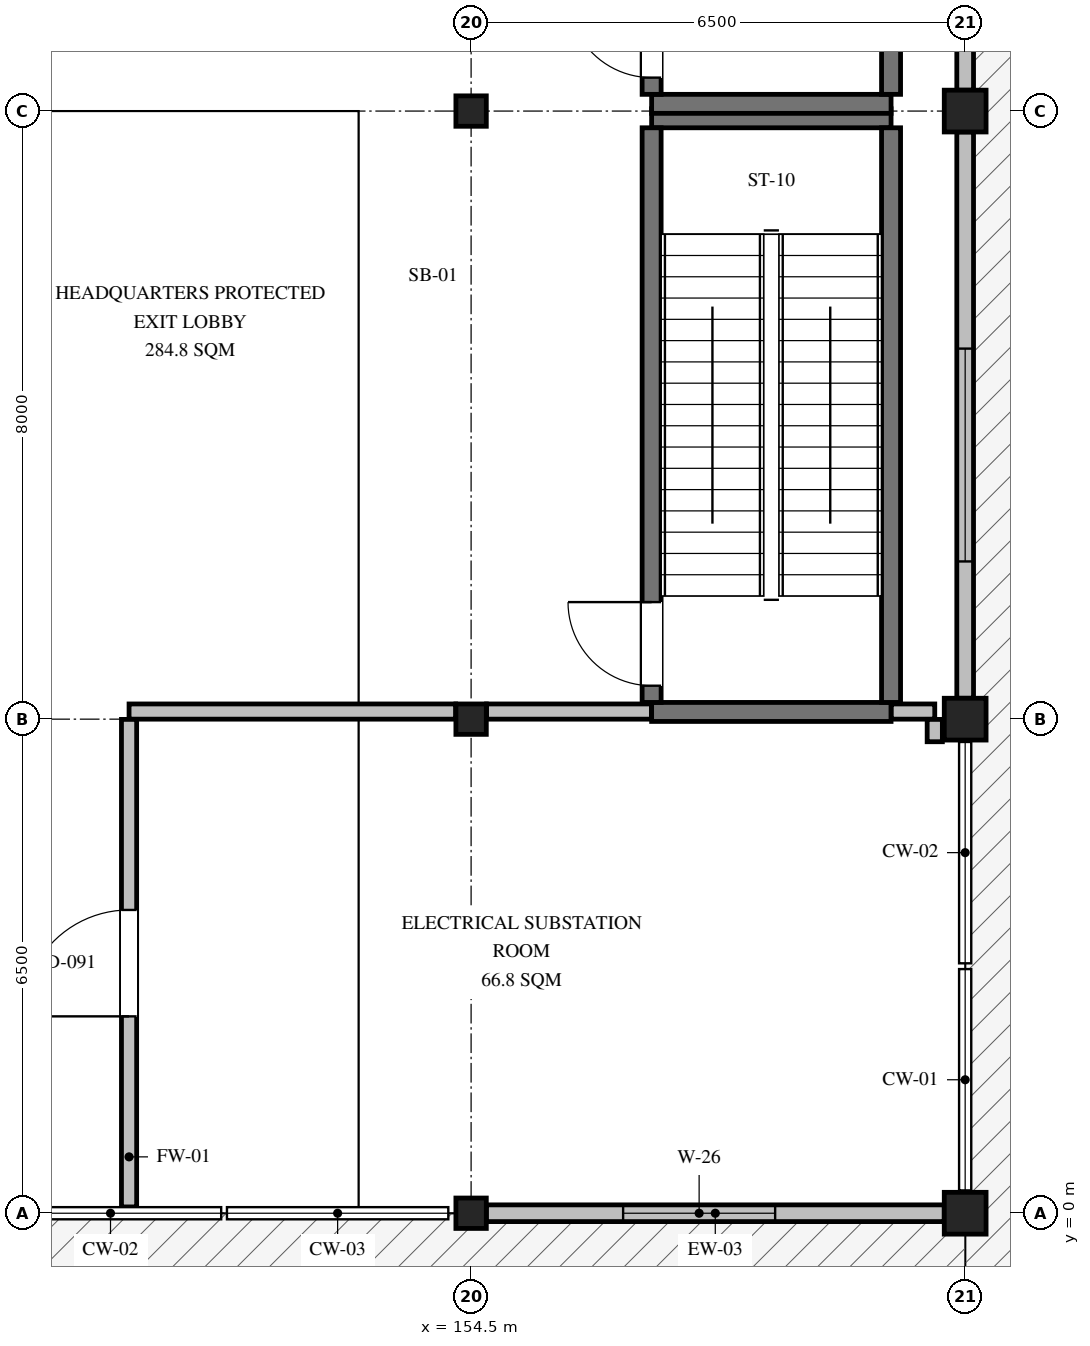
"""IFC4 building model, lengths in metres.
Left out: names, types, materials, properties, quantities, classifications, styles, units other than length and angle.
Written with IfcOpenShell. Run it as: python <this file> out.ifc"""

import sys

from ifc_helpers import new_model, si_unit, direction, frame, frame_2d, origin, origin_2d, place, context, subcontext, project, spatial, rectangle, hollow_rectangle, i_section, extrude, element, fill, save


model = new_model("IFC4")
c1 = context("Model", 3, precision=1e-05, world=origin(), true_north=direction((0.0, 1.0)))
c2 = subcontext(c1, "Body", "Model", "MODEL_VIEW")
j1 = project(units=[si_unit("LENGTHUNIT", "METRE"), si_unit("PLANEANGLEUNIT", "RADIAN")], contexts=[c1])
p1 = place(None, origin())
s1 = spatial("IfcSite", under=j1, at=p1, CompositionType="ELEMENT")
p2 = place(p1, origin())
s2 = spatial("IfcBuilding", under=s1, at=p2, CompositionType="ELEMENT")
p3 = place(p2, frame((0.0, 0.0, 0.45)))
s3 = spatial("IfcBuildingStorey", under=s2, at=p3, CompositionType="ELEMENT", Elevation=0.45)
for number, where, z_axis, x_axis in (
    (1, (154.5, 0.0, -0.45), (0.0, 0.0, 1.0), (1.0, 0.0, 0.0)),
    (2, (154.5, 6.5, -0.45), (0.0, 0.0, 1.0), (1.0, 0.0, 0.0)),
    (3, (154.5, 14.5, -0.45), (0.0, 0.0, 1.0), (1.0, 0.0, 0.0)),
):
    element("IfcColumn", number, at=place(p3, frame(where, z_axis=z_axis, x_axis=x_axis)), inside=s3, PredefinedType="COLUMN", context=c2, shape_type="SweptSolid", body=[
        extrude(i_section(OverallWidth=0.4, OverallDepth=0.4, WebThickness=0.013, FlangeThickness=0.021, FilletRadius=0.022, at=origin_2d()), origin(), (0.0, 0.0, 1.0), 5.85),
    ])
for number, where, z_axis, x_axis in (
    (4, (161.0, 0.0, -0.45), (0.0, 0.0, 1.0), (1.0, 0.0, 0.0)),
    (5, (161.0, 6.5, -0.45), (0.0, 0.0, 1.0), (1.0, 0.0, 0.0)),
    (6, (161.0, 14.5, -0.45), (0.0, 0.0, 1.0), (1.0, 0.0, 0.0)),
):
    element("IfcColumn", number, at=place(p3, frame(where, z_axis=z_axis, x_axis=x_axis)), inside=s3, PredefinedType="COLUMN", context=c2, shape_type="SweptSolid", body=[
        extrude(hollow_rectangle(XDim=0.55, YDim=0.55, WallThickness=0.026, at=origin_2d()), origin(), (0.0, 0.0, 1.0), 5.85),
    ])
p4 = place(p3, frame((154.7, 0.0, 0.0), z_axis=(0.0, 0.0, 1.0), x_axis=(1.0, 0.0, 0.0)))
e7 = element("IfcWall", 7, at=p4, inside=s3, PredefinedType="SOLIDWALL", context=c2, shape_type="SweptSolid", body=[
    extrude(rectangle(XDim=6.025, YDim=0.22, at=frame_2d((3.013, 0.0))), origin(), (0.0, 0.0, 1.0), 4.694),
])
p5 = place(p4, frame((1.8, 0.0, 1.0)))
e8 = element("IfcOpeningElement", 8, at=p5, cuts=e7, PredefinedType="OPENING", context=c2, shape_type="SweptSolid", body=[
    extrude(rectangle(XDim=2.0, YDim=1.8, at=frame_2d((1.0, 0.9))), frame((0.0, 0.12, 0.0), z_axis=(0.0, -1.0, 0.0), x_axis=(1.0, 0.0, 0.0)), (0.0, 0.0, 1.0), 0.24),
])
p6 = place(p3, frame((161.0, 6.775, 0.0), z_axis=(0.0, 0.0, 1.0), x_axis=(0.0, 1.0, 0.0)))
e9 = element("IfcWall", 9, at=p6, inside=s3, PredefinedType="SOLIDWALL", context=c2, shape_type="SweptSolid", body=[
    extrude(rectangle(XDim=7.45, YDim=0.22, at=frame_2d((3.725, 0.0))), origin(), (0.0, 0.0, 1.0), 4.606),
])
p7 = place(p6, frame((1.8, 0.0, 1.05)))
e10 = element("IfcOpeningElement", 10, at=p7, cuts=e9, PredefinedType="OPENING", context=c2, shape_type="SweptSolid", body=[
    extrude(rectangle(XDim=2.8, YDim=1.8, at=frame_2d((1.4, 0.9))), frame((0.0, 0.12, 0.0), z_axis=(0.0, -1.0, 0.0), x_axis=(1.0, 0.0, 0.0)), (0.0, 0.0, 1.0), 0.24),
])
p8 = place(p3, frame((161.0, 14.775, 0.0), z_axis=(0.0, 0.0, 1.0), x_axis=(0.0, 1.0, 0.0)))
e11 = element("IfcWall", 11, at=p8, inside=s3, PredefinedType="SOLIDWALL", context=c2, shape_type="SweptSolid", body=[
    extrude(rectangle(XDim=7.45, YDim=0.22, at=frame_2d((3.725, 0.0))), origin(), (0.0, 0.0, 1.0), 4.544),
])
p9 = place(p8, frame((1.8, 0.0, 1.05)))
e12 = element("IfcOpeningElement", 12, at=p9, cuts=e11, PredefinedType="OPENING", context=c2, shape_type="SweptSolid", body=[
    extrude(rectangle(XDim=1.0, YDim=2.0, at=frame_2d((0.5, 1.0))), frame((0.0, 0.12, 0.0), z_axis=(0.0, -1.0, 0.0), x_axis=(1.0, 0.0, 0.0)), (0.0, 0.0, 1.0), 0.24),
])
for number, where, z_axis, x_axis in (
    (13, (156.875, 6.595, 0.0), (0.0, 0.0, 1.0), (1.0, 0.0, 0.0)),
    (14, (156.875, 14.405, 0.0), (0.0, 0.0, 1.0), (1.0, 0.0, 0.0)),
):
    element("IfcWall", number, at=place(p3, frame(where, z_axis=z_axis, x_axis=x_axis)), inside=s3, PredefinedType="SHEAR", context=c2, shape_type="SweptSolid", body=[
        extrude(rectangle(XDim=3.15, YDim=0.25, at=frame_2d((1.575, 0.0))), origin(), (0.0, 0.0, 1.0), 5.2),
    ])
p10 = place(p3, frame((156.875, 6.72, 0.0), z_axis=(0.0, 0.0, 1.0), x_axis=(0.0, 1.0, 0.0)))
e15 = element("IfcWall", 15, at=p10, inside=s3, PredefinedType="SHEAR", context=c2, shape_type="SweptSolid", body=[
    extrude(rectangle(XDim=7.56, YDim=0.25, at=frame_2d((3.78, 0.0))), origin(), (0.0, 0.0, 1.0), 5.2),
])
p11 = place(p10, frame((0.22, 0.0, 0.0)))
e16 = element("IfcOpeningElement", 16, at=p11, cuts=e15, PredefinedType="OPENING", context=c2, shape_type="SweptSolid", body=[
    extrude(rectangle(XDim=1.1, YDim=2.15, at=frame_2d((0.55, 1.075))), frame((0.0, 0.135, 0.0), z_axis=(0.0, -1.0, 0.0), x_axis=(1.0, 0.0, 0.0)), (0.0, 0.0, 1.0), 0.27),
])
p12 = place(p3, frame((160.025, 6.72, 0.0), z_axis=(0.0, 0.0, 1.0), x_axis=(0.0, 1.0, 0.0)))
e17 = element("IfcWall", 17, at=p12, inside=s3, PredefinedType="SHEAR", context=c2, shape_type="SweptSolid", body=[
    extrude(rectangle(XDim=7.56, YDim=0.25, at=frame_2d((3.78, 0.0))), origin(), (0.0, 0.0, 1.0), 5.2),
])
p13 = place(p3, frame((156.875, 14.595, 0.0), z_axis=(0.0, 0.0, 1.0), x_axis=(1.0, 0.0, 0.0)))
e18 = element("IfcWall", 18, at=p13, inside=s3, PredefinedType="SHEAR", context=c2, shape_type="SweptSolid", body=[
    extrude(rectangle(XDim=3.15, YDim=0.25, at=frame_2d((1.575, 0.0))), origin(), (0.0, 0.0, 1.0), 5.2),
])
p14 = place(p3, frame((156.875, 14.72, 0.0), z_axis=(0.0, 0.0, 1.0), x_axis=(0.0, 1.0, 0.0)))
e19 = element("IfcWall", 19, at=p14, inside=s3, PredefinedType="SHEAR", context=c2, shape_type="SweptSolid", body=[
    extrude(rectangle(XDim=7.56, YDim=0.25, at=frame_2d((3.78, 0.0))), origin(), (0.0, 0.0, 1.0), 5.2),
])
p15 = place(p14, frame((0.22, 0.0, 0.0)))
e20 = element("IfcOpeningElement", 20, at=p15, cuts=e19, PredefinedType="OPENING", context=c2, shape_type="SweptSolid", body=[
    extrude(rectangle(XDim=1.1, YDim=2.15, at=frame_2d((0.55, 1.075))), frame((0.0, 0.135, 0.0), z_axis=(0.0, -1.0, 0.0), x_axis=(1.0, 0.0, 0.0)), (0.0, 0.0, 1.0), 0.27),
])
p16 = place(p3, frame((160.025, 14.72, 0.0), z_axis=(0.0, 0.0, 1.0), x_axis=(0.0, 1.0, 0.0)))
e21 = element("IfcWall", 21, at=p16, inside=s3, PredefinedType="SHEAR", context=c2, shape_type="SweptSolid", body=[
    extrude(rectangle(XDim=7.56, YDim=0.25, at=frame_2d((3.78, 0.0))), origin(), (0.0, 0.0, 1.0), 5.2),
])
p17 = place(p3, frame((150.0, 6.6, 0.0), z_axis=(0.0, 0.0, 1.0), x_axis=(1.0, 0.0, 0.0)))
e22 = element("IfcWall", 22, at=p17, inside=s3, PredefinedType="PARTITIONING", context=c2, shape_type="SweptSolid", body=[
    extrude(rectangle(XDim=4.297, YDim=0.2, at=frame_2d((2.148, 0.0))), origin(), (0.0, 0.0, 1.0), 4.294),
])
p18 = place(p3, frame((154.703, 6.6, 0.0), z_axis=(0.0, 0.0, 1.0), x_axis=(1.0, 0.0, 0.0)))
e23 = element("IfcWall", 23, at=p18, inside=s3, PredefinedType="PARTITIONING", context=c2, shape_type="SweptSolid", body=[
    extrude(rectangle(XDim=2.169, YDim=0.2, at=frame_2d((1.084, 0.0))), origin(), (0.0, 0.0, 1.0), 5.2),
])
p19 = place(p3, frame((160.028, 6.6, 0.0), z_axis=(0.0, 0.0, 1.0), x_axis=(1.0, 0.0, 0.0)))
e24 = element("IfcWall", 24, at=p19, inside=s3, PredefinedType="PARTITIONING", context=c2, shape_type="SweptSolid", body=[
    extrude(rectangle(XDim=0.572, YDim=0.2, at=frame_2d((0.286, 0.0))), origin(), (0.0, 0.0, 1.0), 5.2),
])
p20 = place(p3, frame((150.0, 0.083, 0.0), z_axis=(0.0, 0.0, 1.0), x_axis=(0.0, 1.0, 0.0)))
e25 = element("IfcWall", 25, at=p20, inside=s3, PredefinedType="PARTITIONING", context=c2, shape_type="SweptSolid", body=[
    extrude(rectangle(XDim=6.414, YDim=0.2, at=frame_2d((3.207, 0.0))), origin(), (0.0, 0.0, 1.0), 4.944),
])
p21 = place(p20, frame((2.507, 0.0, 0.0)))
e26 = element("IfcOpeningElement", 26, at=p21, cuts=e25, PredefinedType="OPENING", context=c2, shape_type="SweptSolid", body=[
    extrude(rectangle(XDim=1.4, YDim=2.2, at=frame_2d((0.7, 1.1))), frame((0.0, 0.11, 0.0), z_axis=(0.0, -1.0, 0.0), x_axis=(1.0, 0.0, 0.0)), (0.0, 0.0, 1.0), 0.22),
])
p22 = place(p3, frame((160.6, 6.203, 0.0), z_axis=(0.0, 0.0, 1.0), x_axis=(0.0, 1.0, 0.0)))
e27 = element("IfcWall", 27, at=p22, inside=s3, PredefinedType="PARTITIONING", context=c2, shape_type="SweptSolid", body=[
    extrude(rectangle(XDim=0.294, YDim=0.2, at=frame_2d((0.147, 0.0))), origin(), (0.0, 0.0, 1.0), 5.2),
])
p23 = place(p5, origin())
e28 = element("IfcWindow", 28, at=p23, inside=s3, PartitioningType="SINGLE_PANEL", PredefinedType="WINDOW", context=c2, shape_type="SweptSolid", body=[
    extrude(rectangle(XDim=2.0, YDim=1.8, at=frame_2d((1.0, 0.9))), frame((0.0, 0.03, 0.0), z_axis=(0.0, -1.0, 0.0), x_axis=(1.0, 0.0, 0.0)), (0.0, 0.0, 1.0), 0.06),
])
fill(e8, e28)
p24 = place(p7, origin())
e29 = element("IfcWindow", 29, at=p24, inside=s3, PartitioningType="SINGLE_PANEL", PredefinedType="WINDOW", context=c2, shape_type="SweptSolid", body=[
    extrude(rectangle(XDim=2.8, YDim=1.8, at=frame_2d((1.4, 0.9))), frame((0.0, 0.03, 0.0), z_axis=(0.0, -1.0, 0.0), x_axis=(1.0, 0.0, 0.0)), (0.0, 0.0, 1.0), 0.06),
])
fill(e10, e29)
p25 = place(p11, origin())
e30 = element("IfcDoor", 30, at=p25, inside=s3, OperationType="SINGLE_SWING_RIGHT", PredefinedType="DOOR", context=c2, shape_type="SweptSolid", body=[
    extrude(rectangle(XDim=1.1, YDim=2.15, at=frame_2d((0.55, 1.075))), frame((0.0, 0.025, 0.0), z_axis=(0.0, -1.0, 0.0), x_axis=(1.0, 0.0, 0.0)), (0.0, 0.0, 1.0), 0.05),
])
fill(e16, e30)
p26 = place(p15, origin())
e31 = element("IfcDoor", 31, at=p26, inside=s3, OperationType="SINGLE_SWING_RIGHT", PredefinedType="DOOR", context=c2, shape_type="SweptSolid", body=[
    extrude(rectangle(XDim=1.1, YDim=2.15, at=frame_2d((0.55, 1.075))), frame((0.0, 0.025, 0.0), z_axis=(0.0, -1.0, 0.0), x_axis=(1.0, 0.0, 0.0)), (0.0, 0.0, 1.0), 0.05),
])
fill(e20, e31)
p27 = place(p21, origin())
e32 = element("IfcDoor", 32, at=p27, inside=s3, OperationType="SINGLE_SWING_LEFT", PredefinedType="DOOR", context=c2, shape_type="SweptSolid", body=[
    extrude(rectangle(XDim=1.4, YDim=2.2, at=frame_2d((0.7, 1.1))), frame((0.0, 0.025, 0.0), z_axis=(0.0, -1.0, 0.0), x_axis=(1.0, 0.0, 0.0)), (0.0, 0.0, 1.0), 0.05),
])
fill(e26, e32)
save(model, sys.argv[1])
